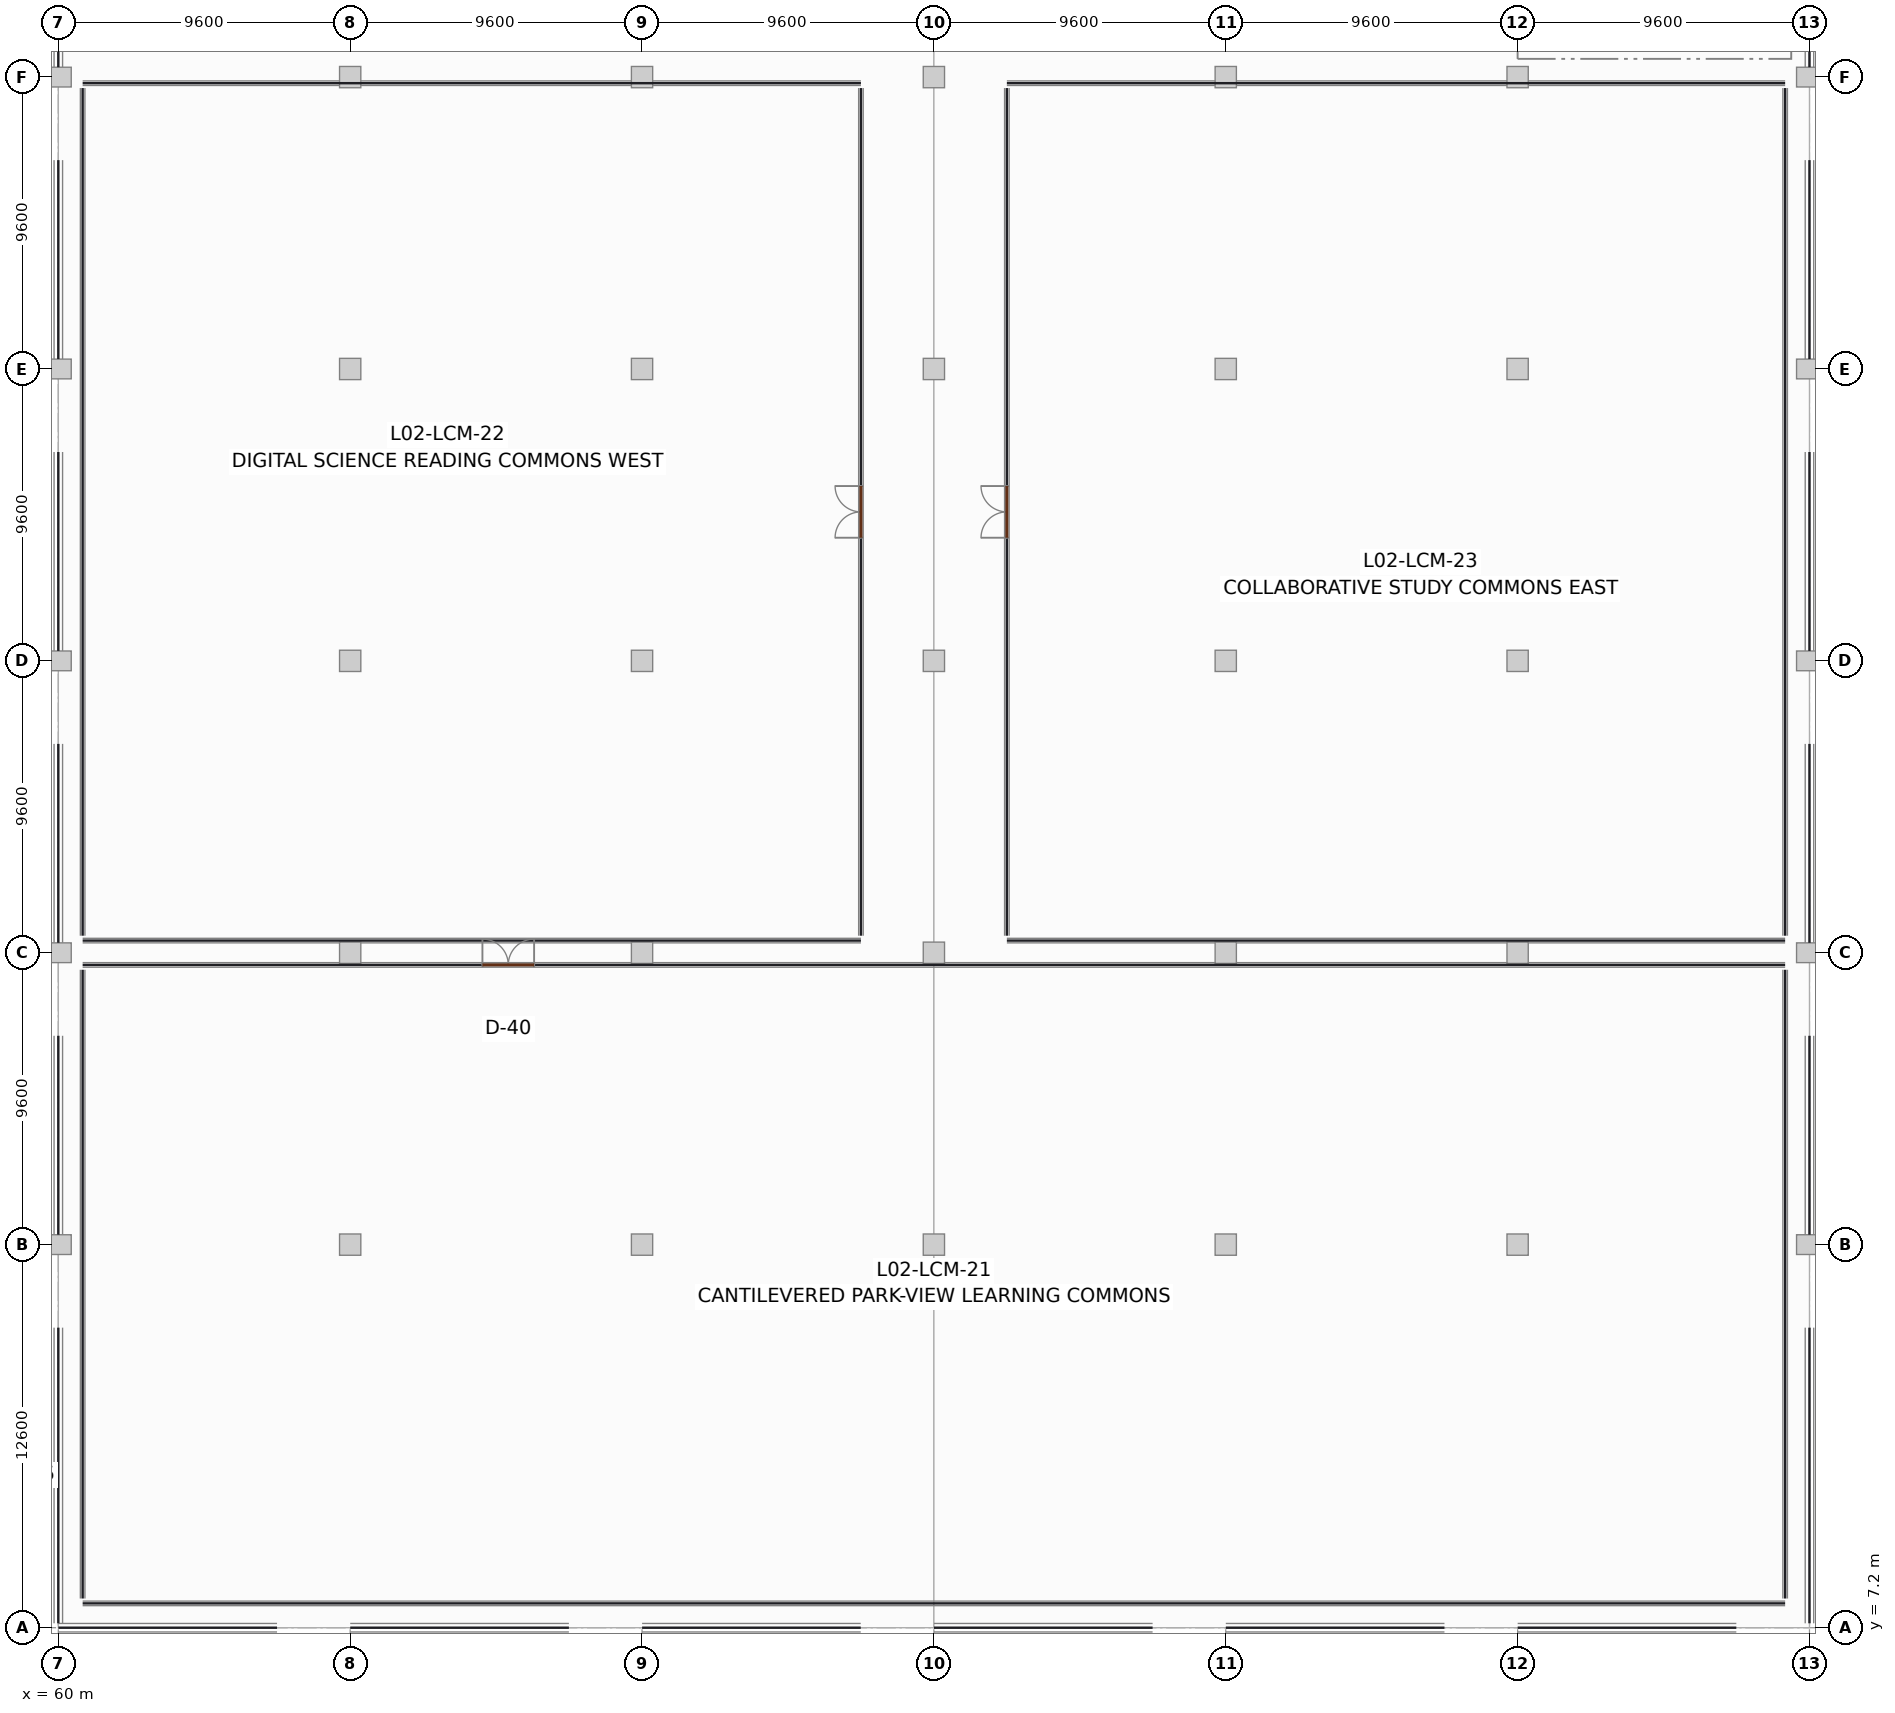
"""IFC4 building model, lengths in metres.
Left out: names, types, materials, properties, quantities, classifications, styles, units other than length and angle.
Written with IfcOpenShell. Run it as: python <this file> out.ifc"""

import sys

from ifc_helpers import new_model, si_unit, direction, frame, frame_2d, origin, origin_2d, place, context, subcontext, project, spatial, rectangle, extrude, element, fill, save


model = new_model("IFC4")
c1 = context("Model", 3, precision=1e-05, world=origin(), true_north=direction((0.0, 1.0)))
c2 = subcontext(c1, "Body", "Model", "MODEL_VIEW")
j1 = project(units=[si_unit("LENGTHUNIT", "METRE"), si_unit("PLANEANGLEUNIT", "RADIAN")], contexts=[c1])
p1 = place(None, origin())
s1 = spatial("IfcSite", under=j1, at=p1, CompositionType="ELEMENT")
p2 = place(p1, origin())
s2 = spatial("IfcBuilding", under=s1, at=p2, CompositionType="ELEMENT")
p3 = place(p2, frame((0.0, 0.0, 9.9)))
s3 = spatial("IfcBuildingStorey", under=s2, at=p3, CompositionType="ELEMENT", Elevation=9.9)
for number, where, z_axis, x_axis in (
    (1, (60.0, 19.8, 0.0), (0.0, 0.0, 1.0), (1.0, 0.0, 0.0)),
    (2, (60.0, 29.4, 0.0), (0.0, 0.0, 1.0), (1.0, 0.0, 0.0)),
    (3, (60.0, 39.0, 0.0), (0.0, 0.0, 1.0), (1.0, 0.0, 0.0)),
    (4, (60.0, 48.6, 0.0), (0.0, 0.0, 1.0), (1.0, 0.0, 0.0)),
    (5, (60.0, 58.2, 0.0), (0.0, 0.0, 1.0), (1.0, 0.0, 0.0)),
):
    element("IfcColumn", number, at=place(p3, frame(where, z_axis=z_axis, x_axis=x_axis)), inside=s3, PredefinedType="COLUMN", context=c2, shape_type="SweptSolid", body=[
        extrude(rectangle(XDim=0.85, YDim=0.65, at=origin_2d()), origin(), (0.0, 0.0, 1.0), 3.9),
    ])
for number, where, z_axis, x_axis in (
    (6, (69.6, 19.8, 0.0), (0.0, 0.0, 1.0), (1.0, 0.0, 0.0)),
    (7, (69.6, 29.4, 0.0), (0.0, 0.0, 1.0), (1.0, 0.0, 0.0)),
    (8, (69.6, 39.0, 0.0), (0.0, 0.0, 1.0), (1.0, 0.0, 0.0)),
    (9, (69.6, 48.6, 0.0), (0.0, 0.0, 1.0), (1.0, 0.0, 0.0)),
    (10, (69.6, 58.2, 0.0), (0.0, 0.0, 1.0), (1.0, 0.0, 0.0)),
    (11, (79.2, 19.8, 0.0), (0.0, 0.0, 1.0), (1.0, 0.0, 0.0)),
    (12, (79.2, 29.4, 0.0), (0.0, 0.0, 1.0), (1.0, 0.0, 0.0)),
    (13, (79.2, 39.0, 0.0), (0.0, 0.0, 1.0), (1.0, 0.0, 0.0)),
    (14, (79.2, 48.6, 0.0), (0.0, 0.0, 1.0), (1.0, 0.0, 0.0)),
    (15, (79.2, 58.2, 0.0), (0.0, 0.0, 1.0), (1.0, 0.0, 0.0)),
    (16, (88.8, 19.8, 0.0), (0.0, 0.0, 1.0), (1.0, 0.0, 0.0)),
    (17, (88.8, 29.4, 0.0), (0.0, 0.0, 1.0), (1.0, 0.0, 0.0)),
    (18, (88.8, 39.0, 0.0), (0.0, 0.0, 1.0), (1.0, 0.0, 0.0)),
    (19, (88.8, 48.6, 0.0), (0.0, 0.0, 1.0), (1.0, 0.0, 0.0)),
    (20, (88.8, 58.2, 0.0), (0.0, 0.0, 1.0), (1.0, 0.0, 0.0)),
    (21, (98.4, 19.8, 0.0), (0.0, 0.0, 1.0), (1.0, 0.0, 0.0)),
    (22, (98.4, 29.4, 0.0), (0.0, 0.0, 1.0), (1.0, 0.0, 0.0)),
    (23, (98.4, 39.0, 0.0), (0.0, 0.0, 1.0), (1.0, 0.0, 0.0)),
    (24, (98.4, 48.6, 0.0), (0.0, 0.0, 1.0), (1.0, 0.0, 0.0)),
    (25, (98.4, 58.2, 0.0), (0.0, 0.0, 1.0), (1.0, 0.0, 0.0)),
    (26, (108.0, 19.8, 0.0), (0.0, 0.0, 1.0), (1.0, 0.0, 0.0)),
    (27, (108.0, 29.4, 0.0), (0.0, 0.0, 1.0), (1.0, 0.0, 0.0)),
    (28, (108.0, 39.0, 0.0), (0.0, 0.0, 1.0), (1.0, 0.0, 0.0)),
    (29, (108.0, 48.6, 0.0), (0.0, 0.0, 1.0), (1.0, 0.0, 0.0)),
    (30, (108.0, 58.2, 0.0), (0.0, 0.0, 1.0), (1.0, 0.0, 0.0)),
):
    element("IfcColumn", number, at=place(p3, frame(where, z_axis=z_axis, x_axis=x_axis)), inside=s3, PredefinedType="COLUMN", context=c2, shape_type="SweptSolid", body=[
        extrude(rectangle(XDim=0.7, YDim=0.7, at=origin_2d()), origin(), (0.0, 0.0, 1.0), 3.9),
    ])
for number, where, z_axis, x_axis in (
    (31, (117.6, 19.8, 0.0), (0.0, 0.0, 1.0), (1.0, 0.0, 0.0)),
    (32, (117.6, 29.4, 0.0), (0.0, 0.0, 1.0), (1.0, 0.0, 0.0)),
    (33, (117.6, 39.0, 0.0), (0.0, 0.0, 1.0), (1.0, 0.0, 0.0)),
    (34, (117.6, 48.6, 0.0), (0.0, 0.0, 1.0), (1.0, 0.0, 0.0)),
    (35, (117.6, 58.2, 0.0), (0.0, 0.0, 1.0), (1.0, 0.0, 0.0)),
):
    element("IfcColumn", number, at=place(p3, frame(where, z_axis=z_axis, x_axis=x_axis)), inside=s3, PredefinedType="COLUMN", context=c2, shape_type="SweptSolid", body=[
        extrude(rectangle(XDim=0.85, YDim=0.65, at=origin_2d()), origin(), (0.0, 0.0, 1.0), 3.9),
    ])
p4 = place(p3, frame((117.6, 7.345, 0.0), z_axis=(0.0, 0.0, 1.0), x_axis=(0.0, 1.0, 0.0)))
e36 = element("IfcWall", 36, at=p4, inside=s3, PredefinedType="SOLIDWALL", context=c2, shape_type="SweptSolid", body=[
    extrude(rectangle(XDim=9.724, YDim=0.28, at=frame_2d((4.862, 0.0))), origin(), (0.0, 0.0, 1.0), 3.08),
])
for number, where, z_axis, x_axis in (
    (37, (117.6, 20.127, 0.0), (0.0, 0.0, 1.0), (0.0, 1.0, 0.0)),
    (38, (117.6, 29.727, 0.0), (0.0, 0.0, 1.0), (0.0, 1.0, 0.0)),
    (39, (117.6, 39.327, 0.0), (0.0, 0.0, 1.0), (0.0, 1.0, 0.0)),
    (40, (117.6, 48.927, 0.0), (0.0, 0.0, 1.0), (0.0, 1.0, 0.0)),
):
    element("IfcWall", number, at=place(p3, frame(where, z_axis=z_axis, x_axis=x_axis)), inside=s3, PredefinedType="SOLIDWALL", context=c2, shape_type="SweptSolid", body=[
        extrude(rectangle(XDim=6.542, YDim=0.28, at=frame_2d((3.271, 0.0))), origin(), (0.0, 0.0, 1.0), 3.08),
    ])
p5 = place(p3, frame((117.6, 58.527, 0.0), z_axis=(0.0, 0.0, 1.0), x_axis=(0.0, 1.0, 0.0)))
e41 = element("IfcWall", 41, at=p5, inside=s3, PredefinedType="SOLIDWALL", context=c2, shape_type="SweptSolid", body=[
    extrude(rectangle(XDim=6.517, YDim=0.28, at=frame_2d((3.258, 0.0))), origin(), (0.0, 0.0, 1.0), 3.08),
])
p6 = place(p3, frame((60.002, 7.2, 0.0), z_axis=(0.0, 0.0, 1.0), x_axis=(1.0, 0.0, 0.0)))
e42 = element("IfcWall", 42, at=p6, inside=s3, PredefinedType="SOLIDWALL", context=c2, shape_type="SweptSolid", body=[
    extrude(rectangle(XDim=7.192, YDim=0.28, at=frame_2d((3.596, 0.0))), origin(), (0.0, 0.0, 1.0), 3.08),
])
p7 = place(p3, frame((69.602, 7.2, 0.0), z_axis=(0.0, 0.0, 1.0), x_axis=(1.0, 0.0, 0.0)))
e43 = element("IfcWall", 43, at=p7, inside=s3, PredefinedType="SOLIDWALL", context=c2, shape_type="SweptSolid", body=[
    extrude(rectangle(XDim=7.192, YDim=0.28, at=frame_2d((3.596, 0.0))), origin(), (0.0, 0.0, 1.0), 3.08),
])
p8 = place(p3, frame((79.202, 7.2, 0.0), z_axis=(0.0, 0.0, 1.0), x_axis=(1.0, 0.0, 0.0)))
e44 = element("IfcWall", 44, at=p8, inside=s3, PredefinedType="SOLIDWALL", context=c2, shape_type="SweptSolid", body=[
    extrude(rectangle(XDim=7.192, YDim=0.28, at=frame_2d((3.596, 0.0))), origin(), (0.0, 0.0, 1.0), 3.08),
])
for number, where, z_axis, x_axis in (
    (45, (88.802, 7.2, 0.0), (0.0, 0.0, 1.0), (1.0, 0.0, 0.0)),
    (46, (98.402, 7.2, 0.0), (0.0, 0.0, 1.0), (1.0, 0.0, 0.0)),
):
    element("IfcWall", number, at=place(p3, frame(where, z_axis=z_axis, x_axis=x_axis)), inside=s3, PredefinedType="SOLIDWALL", context=c2, shape_type="SweptSolid", body=[
        extrude(rectangle(XDim=7.192, YDim=0.28, at=frame_2d((3.596, 0.0))), origin(), (0.0, 0.0, 1.0), 3.08),
    ])
p9 = place(p3, frame((108.002, 7.2, 0.0), z_axis=(0.0, 0.0, 1.0), x_axis=(1.0, 0.0, 0.0)))
e47 = element("IfcWall", 47, at=p9, inside=s3, PredefinedType="SOLIDWALL", context=c2, shape_type="SweptSolid", body=[
    extrude(rectangle(XDim=7.192, YDim=0.28, at=frame_2d((3.596, 0.0))), origin(), (0.0, 0.0, 1.0), 3.08),
])
p10 = place(p3, frame((60.0, 7.345, 0.0), z_axis=(0.0, 0.0, 1.0), x_axis=(0.0, 1.0, 0.0)))
e48 = element("IfcWall", 48, at=p10, inside=s3, PredefinedType="SOLIDWALL", context=c2, shape_type="SweptSolid", body=[
    extrude(rectangle(XDim=9.724, YDim=0.28, at=frame_2d((4.862, 0.0))), origin(), (0.0, 0.0, 1.0), 3.08),
])
for number, where, z_axis, x_axis in (
    (49, (60.0, 20.127, 0.0), (0.0, 0.0, 1.0), (0.0, 1.0, 0.0)),
    (50, (60.0, 29.727, 0.0), (0.0, 0.0, 1.0), (0.0, 1.0, 0.0)),
    (51, (60.0, 39.327, 0.0), (0.0, 0.0, 1.0), (0.0, 1.0, 0.0)),
    (52, (60.0, 48.927, 0.0), (0.0, 0.0, 1.0), (0.0, 1.0, 0.0)),
):
    element("IfcWall", number, at=place(p3, frame(where, z_axis=z_axis, x_axis=x_axis)), inside=s3, PredefinedType="SOLIDWALL", context=c2, shape_type="SweptSolid", body=[
        extrude(rectangle(XDim=6.542, YDim=0.28, at=frame_2d((3.271, 0.0))), origin(), (0.0, 0.0, 1.0), 3.08),
    ])
p11 = place(p3, frame((60.0, 58.527, 0.0), z_axis=(0.0, 0.0, 1.0), x_axis=(0.0, 1.0, 0.0)))
e53 = element("IfcWall", 53, at=p11, inside=s3, PredefinedType="SOLIDWALL", context=c2, shape_type="SweptSolid", body=[
    extrude(rectangle(XDim=6.517, YDim=0.28, at=frame_2d((3.258, 0.0))), origin(), (0.0, 0.0, 1.0), 3.08),
])
p12 = place(p3, frame((60.8, 8.0, 0.0), z_axis=(0.0, 0.0, 1.0), x_axis=(1.0, 0.0, 0.0)))
e54 = element("IfcWall", 54, at=p12, inside=s3, PredefinedType="PARTITIONING", context=c2, shape_type="SweptSolid", body=[
    extrude(rectangle(XDim=56.0, YDim=0.15, at=frame_2d((28.0, 0.0))), origin(), (0.0, 0.0, 1.0), 2.92),
])
p13 = place(p3, frame((60.8, 29.0, 0.0), z_axis=(0.0, 0.0, 1.0), x_axis=(1.0, 0.0, 0.0)))
e55 = element("IfcWall", 55, at=p13, inside=s3, PredefinedType="PARTITIONING", context=c2, shape_type="SweptSolid", body=[
    extrude(rectangle(XDim=56.0, YDim=0.15, at=frame_2d((28.0, 0.0))), origin(), (0.0, 0.0, 1.0), 2.92),
])
p14 = place(p13, frame((13.15, 0.0, 0.0)))
e56 = element("IfcOpeningElement", 56, at=p14, cuts=e55, PredefinedType="OPENING", context=c2, shape_type="SweptSolid", body=[
    extrude(rectangle(XDim=1.7, YDim=2.3, at=frame_2d((0.85, 1.15))), frame((0.0, 0.085, 0.0), z_axis=(0.0, -1.0, 0.0), x_axis=(1.0, 0.0, 0.0)), (0.0, 0.0, 1.0), 0.17),
])
for number, where, z_axis, x_axis in (
    (57, (60.8, 8.16, 0.0), (0.0, 0.0, 1.0), (0.0, 1.0, 0.0)),
    (58, (116.8, 8.16, 0.0), (0.0, 0.0, 1.0), (0.0, 1.0, 0.0)),
):
    element("IfcWall", number, at=place(p3, frame(where, z_axis=z_axis, x_axis=x_axis)), inside=s3, PredefinedType="PARTITIONING", context=c2, shape_type="SweptSolid", body=[
        extrude(rectangle(XDim=20.68, YDim=0.15, at=frame_2d((10.34, 0.0))), origin(), (0.0, 0.0, 1.0), 2.92),
    ])
for number, where, z_axis, x_axis in (
    (59, (60.8, 29.8, 0.0), (0.0, 0.0, 1.0), (1.0, 0.0, 0.0)),
    (60, (60.8, 58.0, 0.0), (0.0, 0.0, 1.0), (1.0, 0.0, 0.0)),
):
    element("IfcWall", number, at=place(p3, frame(where, z_axis=z_axis, x_axis=x_axis)), inside=s3, PredefinedType="PARTITIONING", context=c2, shape_type="SweptSolid", body=[
        extrude(rectangle(XDim=25.6, YDim=0.15, at=frame_2d((12.8, 0.0))), origin(), (0.0, 0.0, 1.0), 2.92),
    ])
p15 = place(p3, frame((60.8, 29.96, 0.0), z_axis=(0.0, 0.0, 1.0), x_axis=(0.0, 1.0, 0.0)))
e61 = element("IfcWall", 61, at=p15, inside=s3, PredefinedType="PARTITIONING", context=c2, shape_type="SweptSolid", body=[
    extrude(rectangle(XDim=27.88, YDim=0.15, at=frame_2d((13.94, 0.0))), origin(), (0.0, 0.0, 1.0), 2.92),
])
p16 = place(p3, frame((86.4, 29.96, 0.0), z_axis=(0.0, 0.0, 1.0), x_axis=(0.0, 1.0, 0.0)))
e62 = element("IfcWall", 62, at=p16, inside=s3, PredefinedType="PARTITIONING", context=c2, shape_type="SweptSolid", body=[
    extrude(rectangle(XDim=27.88, YDim=0.15, at=frame_2d((13.94, 0.0))), origin(), (0.0, 0.0, 1.0), 2.92),
])
p17 = place(p16, frame((13.09, 0.0, 0.0)))
e63 = element("IfcOpeningElement", 63, at=p17, cuts=e62, PredefinedType="OPENING", context=c2, shape_type="SweptSolid", body=[
    extrude(rectangle(XDim=1.7, YDim=2.3, at=frame_2d((0.85, 1.15))), frame((0.0, 0.085, 0.0), z_axis=(0.0, -1.0, 0.0), x_axis=(1.0, 0.0, 0.0)), (0.0, 0.0, 1.0), 0.17),
])
for number, where, z_axis, x_axis in (
    (64, (91.2, 29.8, 0.0), (0.0, 0.0, 1.0), (1.0, 0.0, 0.0)),
    (65, (91.2, 58.0, 0.0), (0.0, 0.0, 1.0), (1.0, 0.0, 0.0)),
):
    element("IfcWall", number, at=place(p3, frame(where, z_axis=z_axis, x_axis=x_axis)), inside=s3, PredefinedType="PARTITIONING", context=c2, shape_type="SweptSolid", body=[
        extrude(rectangle(XDim=25.6, YDim=0.15, at=frame_2d((12.8, 0.0))), origin(), (0.0, 0.0, 1.0), 2.92),
    ])
p18 = place(p3, frame((91.2, 29.96, 0.0), z_axis=(0.0, 0.0, 1.0), x_axis=(0.0, 1.0, 0.0)))
e66 = element("IfcWall", 66, at=p18, inside=s3, PredefinedType="PARTITIONING", context=c2, shape_type="SweptSolid", body=[
    extrude(rectangle(XDim=27.88, YDim=0.15, at=frame_2d((13.94, 0.0))), origin(), (0.0, 0.0, 1.0), 2.92),
])
p19 = place(p18, frame((13.09, 0.0, 0.0)))
e67 = element("IfcOpeningElement", 67, at=p19, cuts=e66, PredefinedType="OPENING", context=c2, shape_type="SweptSolid", body=[
    extrude(rectangle(XDim=1.7, YDim=2.3, at=frame_2d((0.85, 1.15))), frame((0.0, 0.085, 0.0), z_axis=(0.0, -1.0, 0.0), x_axis=(1.0, 0.0, 0.0)), (0.0, 0.0, 1.0), 0.17),
])
p20 = place(p3, frame((116.8, 29.96, 0.0), z_axis=(0.0, 0.0, 1.0), x_axis=(0.0, 1.0, 0.0)))
e68 = element("IfcWall", 68, at=p20, inside=s3, PredefinedType="PARTITIONING", context=c2, shape_type="SweptSolid", body=[
    extrude(rectangle(XDim=27.88, YDim=0.15, at=frame_2d((13.94, 0.0))), origin(), (0.0, 0.0, 1.0), 2.92),
])
p21 = place(p14, origin())
e69 = element("IfcDoor", 69, at=p21, inside=s3, OperationType="DOUBLE_DOOR_SINGLE_SWING", PredefinedType="DOOR", context=c2, shape_type="SweptSolid", body=[
    extrude(rectangle(XDim=1.7, YDim=2.3, at=frame_2d((0.85, 1.15))), frame((0.0, 0.025, 0.0), z_axis=(0.0, -1.0, 0.0), x_axis=(1.0, 0.0, 0.0)), (0.0, 0.0, 1.0), 0.05),
])
fill(e56, e69)
p22 = place(p17, origin())
e70 = element("IfcDoor", 70, at=p22, inside=s3, OperationType="DOUBLE_DOOR_SINGLE_SWING", PredefinedType="DOOR", context=c2, shape_type="SweptSolid", body=[
    extrude(rectangle(XDim=1.7, YDim=2.3, at=frame_2d((0.85, 1.15))), frame((0.0, 0.025, 0.0), z_axis=(0.0, -1.0, 0.0), x_axis=(1.0, 0.0, 0.0)), (0.0, 0.0, 1.0), 0.05),
])
fill(e63, e70)
p23 = place(p19, origin())
e71 = element("IfcDoor", 71, at=p23, inside=s3, OperationType="DOUBLE_DOOR_SINGLE_SWING", PredefinedType="DOOR", context=c2, shape_type="SweptSolid", body=[
    extrude(rectangle(XDim=1.7, YDim=2.3, at=frame_2d((0.85, 1.15))), frame((0.0, 0.025, 0.0), z_axis=(0.0, -1.0, 0.0), x_axis=(1.0, 0.0, 0.0)), (0.0, 0.0, 1.0), 0.05),
])
fill(e67, e71)
save(model, sys.argv[1])
